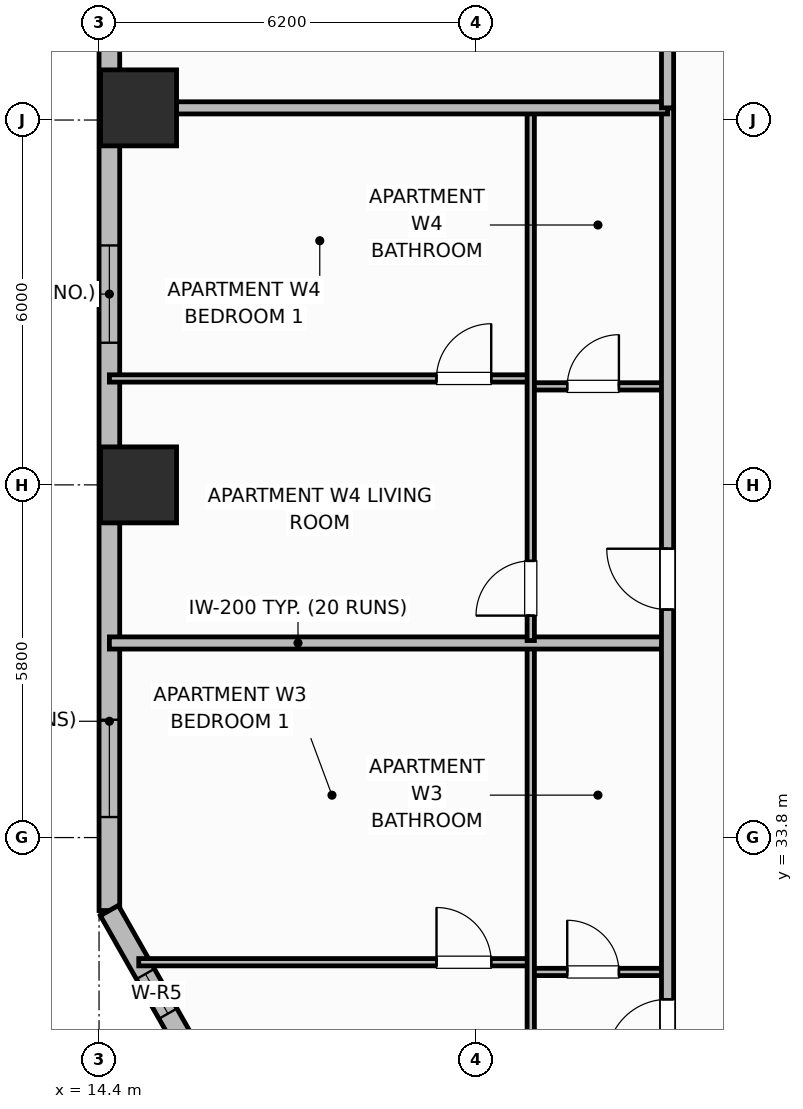
"""IFC4 building model, lengths in metres.
Left out: names, types, materials, properties, quantities, classifications, styles, units other than length and angle.
Written with IfcOpenShell. Run it as: python <this file> out.ifc"""

import sys

from ifc_helpers import new_model, si_unit, direction, frame, frame_2d, origin, origin_2d, place, context, subcontext, project, spatial, rectangle, extrude, element, fill, save


model = new_model("IFC4")
c1 = context("Model", 3, precision=1e-05, world=origin(), true_north=direction((0.0, 1.0)))
c2 = subcontext(c1, "Body", "Model", "MODEL_VIEW")
j1 = project(units=[si_unit("LENGTHUNIT", "METRE"), si_unit("PLANEANGLEUNIT", "RADIAN")], contexts=[c1])
p1 = place(None, origin())
s1 = spatial("IfcSite", under=j1, at=p1, CompositionType="ELEMENT")
p2 = place(p1, origin())
s2 = spatial("IfcBuilding", under=s1, at=p2, CompositionType="ELEMENT")
p3 = place(p2, frame((0.0, 0.0, 51.0)))
s3 = spatial("IfcBuildingStorey", under=s2, at=p3, CompositionType="ELEMENT", Elevation=51.0)
for number, where, z_axis, x_axis in (
    (1, (15.05, 39.6, 0.0), (0.0, 0.0, 1.0), (1.0, 0.0, 0.0)),
    (2, (15.05, 45.8, 0.0), (0.0, 0.0, 1.0), (1.0, 0.0, 0.0)),
):
    element("IfcColumn", number, at=place(p3, frame(where, z_axis=z_axis, x_axis=x_axis)), inside=s3, PredefinedType="COLUMN", context=c2, shape_type="SweptSolid", body=[
        extrude(rectangle(XDim=1.25, YDim=1.25, at=origin_2d()), origin(), (0.0, 0.0, 1.0), 3.7),
    ])
p4 = place(p3, frame((14.57, 47.4, 0.0), z_axis=(0.0, 0.0, 1.0), x_axis=(0.0, -1.0, 0.0)))
e3 = element("IfcWall", 3, at=p4, inside=s3, PredefinedType="SOLIDWALL", context=c2, shape_type="SweptSolid", body=[
    extrude(rectangle(XDim=14.8, YDim=0.34, at=frame_2d((7.4, 0.0))), origin(), (0.0, 0.0, 1.0), 2.7),
])
p5 = place(p4, frame((3.863, 0.0, 0.68)))
e4 = element("IfcOpeningElement", 4, at=p5, cuts=e3, PredefinedType="OPENING", context=c2, shape_type="SweptSolid", body=[
    extrude(rectangle(XDim=1.6, YDim=1.9, at=frame_2d((0.8, 0.95))), frame((0.0, 0.18, 0.0), z_axis=(0.0, -1.0, 0.0), x_axis=(1.0, 0.0, 0.0)), (0.0, 0.0, 1.0), 0.36),
])
p6 = place(p4, frame((11.663, 0.0, 0.68)))
e5 = element("IfcOpeningElement", 5, at=p6, cuts=e3, PredefinedType="OPENING", context=c2, shape_type="SweptSolid", body=[
    extrude(rectangle(XDim=1.6, YDim=1.9, at=frame_2d((0.8, 0.95))), frame((0.0, 0.18, 0.0), z_axis=(0.0, -1.0, 0.0), x_axis=(1.0, 0.0, 0.0)), (0.0, 0.0, 1.0), 0.36),
])
p7 = place(p3, frame((14.57, 32.6, 0.0), z_axis=(0.0, 0.0, 1.0), x_axis=(0.493976255291, -0.869475393101, 0.0)))
e6 = element("IfcWall", 6, at=p7, inside=s3, PredefinedType="SOLIDWALL", context=c2, shape_type="SweptSolid", body=[
    extrude(rectangle(XDim=2.531, YDim=0.34, at=frame_2d((1.265, 0.0))), origin(), (0.0, 0.0, 1.0), 2.7),
])
p8 = place(p7, frame((1.2, 0.0, 0.89)))
e7 = element("IfcOpeningElement", 7, at=p8, cuts=e6, PredefinedType="OPENING", context=c2, shape_type="SweptSolid", body=[
    extrude(rectangle(XDim=0.75, YDim=1.65, at=frame_2d((0.375, 0.825))), frame((0.0, 0.18, 0.0), z_axis=(0.0, -1.0, 0.0), x_axis=(1.0, 0.0, 0.0)), (0.0, 0.0, 1.0), 0.36),
])
p9 = place(p3, frame((21.5, 31.59, 0.0), z_axis=(0.0, 0.0, 1.0), x_axis=(1.0, 0.0, 0.0)))
e8 = element("IfcWall", 8, at=p9, inside=s3, PredefinedType="PARTITIONING", context=c2, shape_type="SweptSolid", body=[
    extrude(rectangle(XDim=2.25, YDim=0.12, at=frame_2d((1.125, 0.0))), origin(), (0.0, 0.0, 1.0), 2.53),
])
p10 = place(p9, frame((0.6, 0.0, 0.0)))
e9 = element("IfcOpeningElement", 9, at=p10, cuts=e8, PredefinedType="OPENING", context=c2, shape_type="SweptSolid", body=[
    extrude(rectangle(XDim=0.85, YDim=2.1, at=frame_2d((0.425, 1.05))), frame((0.0, 0.07, 0.0), z_axis=(0.0, -1.0, 0.0), x_axis=(1.0, 0.0, 0.0)), (0.0, 0.0, 1.0), 0.14),
])
p11 = place(p3, frame((15.053, 31.75, 0.0), z_axis=(0.0, 0.0, 1.0), x_axis=(1.0, 0.0, 0.0)))
e10 = element("IfcWall", 10, at=p11, inside=s3, PredefinedType="PARTITIONING", context=c2, shape_type="SweptSolid", body=[
    extrude(rectangle(XDim=6.447, YDim=0.12, at=frame_2d((3.224, 0.0))), origin(), (0.0, 0.0, 1.0), 2.53),
])
p12 = place(p11, frame((4.897, 0.0, 0.0)))
e11 = element("IfcOpeningElement", 11, at=p12, cuts=e10, PredefinedType="OPENING", context=c2, shape_type="SweptSolid", body=[
    extrude(rectangle(XDim=0.9, YDim=2.1, at=frame_2d((0.45, 1.05))), frame((0.0, 0.07, 0.0), z_axis=(0.0, -1.0, 0.0), x_axis=(1.0, 0.0, 0.0)), (0.0, 0.0, 1.0), 0.14),
])
p13 = place(p3, frame((21.5, 26.64, 0.0), z_axis=(0.0, 0.0, 1.0), x_axis=(0.0, 1.0, 0.0)))
e12 = element("IfcWall", 12, at=p13, inside=s3, PredefinedType="PARTITIONING", context=c2, shape_type="SweptSolid", body=[
    extrude(rectangle(XDim=10.32, YDim=0.12, at=frame_2d((5.16, 0.0))), origin(), (0.0, 0.0, 1.0), 2.53),
])
p14 = place(p13, frame((2.81, 0.0, 0.0)))
e13 = element("IfcOpeningElement", 13, at=p14, cuts=e12, PredefinedType="OPENING", context=c2, shape_type="SweptSolid", body=[
    extrude(rectangle(XDim=0.9, YDim=2.1, at=frame_2d((0.45, 1.05))), frame((0.0, 0.07, 0.0), z_axis=(0.0, -1.0, 0.0), x_axis=(1.0, 0.0, 0.0)), (0.0, 0.0, 1.0), 0.14),
])
p15 = place(p3, frame((14.57, 37.0, 0.0), z_axis=(0.0, 0.0, 1.0), x_axis=(1.0, 0.0, 0.0)))
e14 = element("IfcWall", 14, at=p15, inside=s3, PredefinedType="PARTITIONING", context=c2, shape_type="SweptSolid", body=[
    extrude(rectangle(XDim=9.18, YDim=0.2, at=frame_2d((4.59, 0.0))), origin(), (0.0, 0.0, 1.0), 2.53),
])
p16 = place(p3, frame((21.5, 41.22, 0.0), z_axis=(0.0, 0.0, 1.0), x_axis=(1.0, 0.0, 0.0)))
e15 = element("IfcWall", 15, at=p16, inside=s3, PredefinedType="PARTITIONING", context=c2, shape_type="SweptSolid", body=[
    extrude(rectangle(XDim=2.25, YDim=0.12, at=frame_2d((1.125, 0.0))), origin(), (0.0, 0.0, 1.0), 2.53),
])
p17 = place(p16, frame((0.6, 0.0, 0.0)))
e16 = element("IfcOpeningElement", 16, at=p17, cuts=e15, PredefinedType="OPENING", context=c2, shape_type="SweptSolid", body=[
    extrude(rectangle(XDim=0.85, YDim=2.1, at=frame_2d((0.425, 1.05))), frame((0.0, 0.07, 0.0), z_axis=(0.0, -1.0, 0.0), x_axis=(1.0, 0.0, 0.0)), (0.0, 0.0, 1.0), 0.14),
])
p18 = place(p3, frame((14.57, 41.35, 0.0), z_axis=(0.0, 0.0, 1.0), x_axis=(1.0, 0.0, 0.0)))
e17 = element("IfcWall", 17, at=p18, inside=s3, PredefinedType="PARTITIONING", context=c2, shape_type="SweptSolid", body=[
    extrude(rectangle(XDim=6.93, YDim=0.12, at=frame_2d((3.465, 0.0))), origin(), (0.0, 0.0, 1.0), 2.53),
])
p19 = place(p18, frame((5.38, 0.0, 0.0)))
e18 = element("IfcOpeningElement", 18, at=p19, cuts=e17, PredefinedType="OPENING", context=c2, shape_type="SweptSolid", body=[
    extrude(rectangle(XDim=0.9, YDim=2.1, at=frame_2d((0.45, 1.05))), frame((0.0, 0.07, 0.0), z_axis=(0.0, -1.0, 0.0), x_axis=(1.0, 0.0, 0.0)), (0.0, 0.0, 1.0), 0.14),
])
p20 = place(p3, frame((21.5, 37.04, 0.0), z_axis=(0.0, 0.0, 1.0), x_axis=(0.0, 1.0, 0.0)))
e19 = element("IfcWall", 19, at=p20, inside=s3, PredefinedType="PARTITIONING", context=c2, shape_type="SweptSolid", body=[
    extrude(rectangle(XDim=8.72, YDim=0.12, at=frame_2d((4.36, 0.0))), origin(), (0.0, 0.0, 1.0), 2.53),
])
p21 = place(p20, frame((0.41, 0.0, 0.0)))
e20 = element("IfcOpeningElement", 20, at=p21, cuts=e19, PredefinedType="OPENING", context=c2, shape_type="SweptSolid", body=[
    extrude(rectangle(XDim=0.9, YDim=2.1, at=frame_2d((0.45, 1.05))), frame((0.0, 0.07, 0.0), z_axis=(0.0, -1.0, 0.0), x_axis=(1.0, 0.0, 0.0)), (0.0, 0.0, 1.0), 0.14),
])
p22 = place(p3, frame((23.75, 10.6, 0.0), z_axis=(0.0, 0.0, 1.0), x_axis=(0.0, 1.0, 0.0)))
e21 = element("IfcWall", 21, at=p22, inside=s3, PredefinedType="PARTITIONING", context=c2, shape_type="SweptSolid", body=[
    extrude(rectangle(XDim=35.2, YDim=0.2, at=frame_2d((17.6, 0.0))), origin(), (0.0, 0.0, 1.0), 2.53),
])
p23 = place(p22, frame((2.65, 0.0, 0.0)))
e22 = element("IfcOpeningElement", 22, at=p23, cuts=e21, PredefinedType="OPENING", context=c2, shape_type="SweptSolid", body=[
    extrude(rectangle(XDim=1.0, YDim=2.15, at=frame_2d((0.5, 1.075))), frame((0.0, 0.11, 0.0), z_axis=(0.0, -1.0, 0.0), x_axis=(1.0, 0.0, 0.0)), (0.0, 0.0, 1.0), 0.22),
])
p24 = place(p22, frame((10.81, 0.0, 0.0)))
e23 = element("IfcOpeningElement", 23, at=p24, cuts=e21, PredefinedType="OPENING", context=c2, shape_type="SweptSolid", body=[
    extrude(rectangle(XDim=1.0, YDim=2.15, at=frame_2d((0.5, 1.075))), frame((0.0, 0.11, 0.0), z_axis=(0.0, -1.0, 0.0), x_axis=(1.0, 0.0, 0.0)), (0.0, 0.0, 1.0), 0.22),
])
p25 = place(p22, frame((19.54, 0.0, 0.0)))
e24 = element("IfcOpeningElement", 24, at=p25, cuts=e21, PredefinedType="OPENING", context=c2, shape_type="SweptSolid", body=[
    extrude(rectangle(XDim=1.0, YDim=2.15, at=frame_2d((0.5, 1.075))), frame((0.0, 0.11, 0.0), z_axis=(0.0, -1.0, 0.0), x_axis=(1.0, 0.0, 0.0)), (0.0, 0.0, 1.0), 0.22),
])
p26 = place(p22, frame((26.95, 0.0, 0.0)))
e25 = element("IfcOpeningElement", 25, at=p26, cuts=e21, PredefinedType="OPENING", context=c2, shape_type="SweptSolid", body=[
    extrude(rectangle(XDim=1.0, YDim=2.15, at=frame_2d((0.5, 1.075))), frame((0.0, 0.11, 0.0), z_axis=(0.0, -1.0, 0.0), x_axis=(1.0, 0.0, 0.0)), (0.0, 0.0, 1.0), 0.22),
])
p27 = place(p3, frame((14.99, 45.8, 0.0), z_axis=(0.0, 0.0, 1.0), x_axis=(1.0, 0.0, 0.0)))
e26 = element("IfcWall", 26, at=p27, inside=s3, PredefinedType="PARTITIONING", context=c2, shape_type="SweptSolid", body=[
    extrude(rectangle(XDim=8.76, YDim=0.2, at=frame_2d((4.38, 0.0))), origin(), (0.0, 0.0, 1.0), 2.53),
])
p28 = place(p3, frame((23.75, 45.8, 0.0), z_axis=(0.0, 0.0, 1.0), x_axis=(0.0, 1.0, 0.0)))
e27 = element("IfcWall", 27, at=p28, inside=s3, PredefinedType="PARTITIONING", context=c2, shape_type="SweptSolid", body=[
    extrude(rectangle(XDim=5.63, YDim=0.2, at=frame_2d((2.815, 0.0))), origin(), (0.0, 0.0, 1.0), 2.53),
])
p29 = place(p5, origin())
e28 = element("IfcWindow", 28, at=p29, inside=s3, PartitioningType="SINGLE_PANEL", PredefinedType="WINDOW", context=c2, shape_type="SweptSolid", body=[
    extrude(rectangle(XDim=1.6, YDim=1.9, at=frame_2d((0.8, 0.95))), frame((0.0, 0.03, 0.0), z_axis=(0.0, -1.0, 0.0), x_axis=(1.0, 0.0, 0.0)), (0.0, 0.0, 1.0), 0.06),
])
fill(e4, e28)
p30 = place(p6, origin())
e29 = element("IfcWindow", 29, at=p30, inside=s3, PartitioningType="SINGLE_PANEL", PredefinedType="WINDOW", context=c2, shape_type="SweptSolid", body=[
    extrude(rectangle(XDim=1.6, YDim=1.9, at=frame_2d((0.8, 0.95))), frame((0.0, 0.03, 0.0), z_axis=(0.0, -1.0, 0.0), x_axis=(1.0, 0.0, 0.0)), (0.0, 0.0, 1.0), 0.06),
])
fill(e5, e29)
p31 = place(p8, origin())
e30 = element("IfcWindow", 30, at=p31, inside=s3, PartitioningType="SINGLE_PANEL", PredefinedType="WINDOW", context=c2, shape_type="SweptSolid", body=[
    extrude(rectangle(XDim=0.75, YDim=1.65, at=frame_2d((0.375, 0.825))), frame((0.0, 0.03, 0.0), z_axis=(0.0, -1.0, 0.0), x_axis=(1.0, 0.0, 0.0)), (0.0, 0.0, 1.0), 0.06),
])
fill(e7, e30)
p32 = place(p10, origin())
e31 = element("IfcDoor", 31, at=p32, inside=s3, OperationType="SINGLE_SWING_LEFT", PredefinedType="DOOR", context=c2, shape_type="SweptSolid", body=[
    extrude(rectangle(XDim=0.85, YDim=2.1, at=frame_2d((0.425, 1.05))), frame((0.0, 0.025, 0.0), z_axis=(0.0, -1.0, 0.0), x_axis=(1.0, 0.0, 0.0)), (0.0, 0.0, 1.0), 0.05),
])
fill(e9, e31)
p33 = place(p12, origin())
e32 = element("IfcDoor", 32, at=p33, inside=s3, OperationType="SINGLE_SWING_LEFT", PredefinedType="DOOR", context=c2, shape_type="SweptSolid", body=[
    extrude(rectangle(XDim=0.9, YDim=2.1, at=frame_2d((0.45, 1.05))), frame((0.0, 0.025, 0.0), z_axis=(0.0, -1.0, 0.0), x_axis=(1.0, 0.0, 0.0)), (0.0, 0.0, 1.0), 0.05),
])
fill(e11, e32)
p34 = place(p17, origin())
e33 = element("IfcDoor", 33, at=p34, inside=s3, OperationType="SINGLE_SWING_RIGHT", PredefinedType="DOOR", context=c2, shape_type="SweptSolid", body=[
    extrude(rectangle(XDim=0.85, YDim=2.1, at=frame_2d((0.425, 1.05))), frame((0.0, 0.025, 0.0), z_axis=(0.0, -1.0, 0.0), x_axis=(1.0, 0.0, 0.0)), (0.0, 0.0, 1.0), 0.05),
])
fill(e16, e33)
p35 = place(p19, origin())
e34 = element("IfcDoor", 34, at=p35, inside=s3, OperationType="SINGLE_SWING_RIGHT", PredefinedType="DOOR", context=c2, shape_type="SweptSolid", body=[
    extrude(rectangle(XDim=0.9, YDim=2.1, at=frame_2d((0.45, 1.05))), frame((0.0, 0.025, 0.0), z_axis=(0.0, -1.0, 0.0), x_axis=(1.0, 0.0, 0.0)), (0.0, 0.0, 1.0), 0.05),
])
fill(e18, e34)
p36 = place(p21, origin())
e35 = element("IfcDoor", 35, at=p36, inside=s3, OperationType="SINGLE_SWING_LEFT", PredefinedType="DOOR", context=c2, shape_type="SweptSolid", body=[
    extrude(rectangle(XDim=0.9, YDim=2.1, at=frame_2d((0.45, 1.05))), frame((0.0, 0.025, 0.0), z_axis=(0.0, -1.0, 0.0), x_axis=(1.0, 0.0, 0.0)), (0.0, 0.0, 1.0), 0.05),
])
fill(e20, e35)
p37 = place(p25, origin())
e36 = element("IfcDoor", 36, at=p37, inside=s3, OperationType="SINGLE_SWING_LEFT", PredefinedType="DOOR", context=c2, shape_type="SweptSolid", body=[
    extrude(rectangle(XDim=1.0, YDim=2.15, at=frame_2d((0.5, 1.075))), frame((0.0, 0.025, 0.0), z_axis=(0.0, -1.0, 0.0), x_axis=(1.0, 0.0, 0.0)), (0.0, 0.0, 1.0), 0.05),
])
fill(e24, e36)
p38 = place(p26, origin())
e37 = element("IfcDoor", 37, at=p38, inside=s3, OperationType="SINGLE_SWING_RIGHT", PredefinedType="DOOR", context=c2, shape_type="SweptSolid", body=[
    extrude(rectangle(XDim=1.0, YDim=2.15, at=frame_2d((0.5, 1.075))), frame((0.0, 0.025, 0.0), z_axis=(0.0, -1.0, 0.0), x_axis=(1.0, 0.0, 0.0)), (0.0, 0.0, 1.0), 0.05),
])
fill(e25, e37)
save(model, sys.argv[1])
